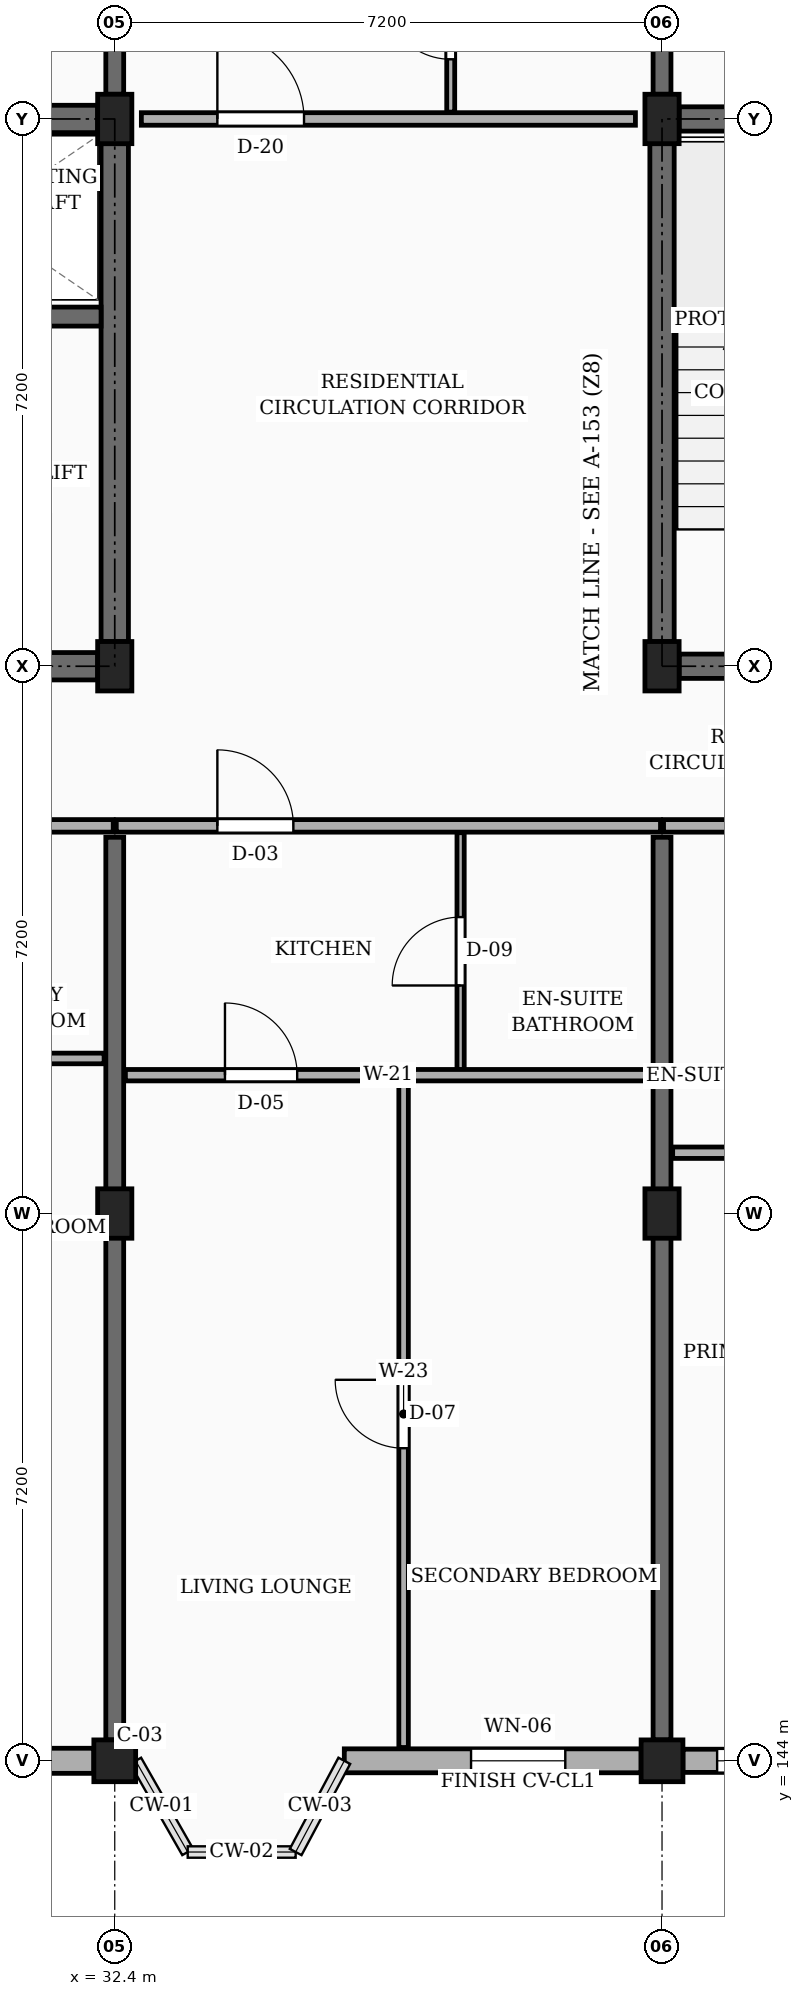
"""IFC4 building model, lengths in metres.
Left out: names, types, materials, properties, quantities, classifications, styles, units other than length and angle.
Written with IfcOpenShell. Run it as: python <this file> out.ifc"""

import sys

from ifc_helpers import new_model, si_unit, direction, frame, frame_2d, origin, origin_2d, place, context, subcontext, project, spatial, rectangle, extrude, element, fill, save


model = new_model("IFC4")
c1 = context("Model", 3, precision=1e-05, world=origin(), true_north=direction((0.0, 1.0)))
c2 = subcontext(c1, "Body", "Model", "MODEL_VIEW")
j1 = project(units=[si_unit("LENGTHUNIT", "METRE"), si_unit("PLANEANGLEUNIT", "RADIAN")], contexts=[c1])
p1 = place(None, origin())
s1 = spatial("IfcSite", under=j1, at=p1, CompositionType="ELEMENT")
p2 = place(p1, origin())
s2 = spatial("IfcBuilding", under=s1, at=p2, CompositionType="ELEMENT")
p3 = place(p2, frame((0.0, 0.0, 17.1)))
s3 = spatial("IfcBuildingStorey", under=s2, at=p3, CompositionType="ELEMENT", Elevation=17.1)
p4 = place(p3, frame((32.4, 144.0, 0.0), z_axis=(0.0, 0.0, 1.0), x_axis=(1.0, 0.0, 0.0)))
e1 = element("IfcColumn", 1, at=p4, inside=s3, PredefinedType="COLUMN", context=c2, shape_type="SweptSolid", body=[
    extrude(rectangle(XDim=0.55, YDim=0.55, at=origin_2d()), origin(), (0.0, 0.0, 1.0), 3.15),
])
for number, where, z_axis, x_axis in (
    (2, (32.4, 151.2, 0.0), (0.0, 0.0, 1.0), (1.0, 0.0, 0.0)),
    (3, (32.4, 158.4, 0.0), (0.0, 0.0, 1.0), (1.0, 0.0, 0.0)),
    (4, (32.4, 165.6, 0.0), (0.0, 0.0, 1.0), (1.0, 0.0, 0.0)),
):
    element("IfcColumn", number, at=place(p3, frame(where, z_axis=z_axis, x_axis=x_axis)), inside=s3, PredefinedType="COLUMN", context=c2, shape_type="SweptSolid", body=[
        extrude(rectangle(XDim=0.45, YDim=0.65, at=origin_2d()), origin(), (0.0, 0.0, 1.0), 3.15),
    ])
p5 = place(p3, frame((39.6, 144.0, 0.0), z_axis=(0.0, 0.0, 1.0), x_axis=(1.0, 0.0, 0.0)))
e5 = element("IfcColumn", 5, at=p5, inside=s3, PredefinedType="COLUMN", context=c2, shape_type="SweptSolid", body=[
    extrude(rectangle(XDim=0.55, YDim=0.55, at=origin_2d()), origin(), (0.0, 0.0, 1.0), 3.15),
])
for number, where, z_axis, x_axis in (
    (6, (39.6, 151.2, 0.0), (0.0, 0.0, 1.0), (1.0, 0.0, 0.0)),
    (7, (39.6, 158.4, 0.0), (0.0, 0.0, 1.0), (1.0, 0.0, 0.0)),
    (8, (39.6, 165.6, 0.0), (0.0, 0.0, 1.0), (1.0, 0.0, 0.0)),
):
    element("IfcColumn", number, at=place(p3, frame(where, z_axis=z_axis, x_axis=x_axis)), inside=s3, PredefinedType="COLUMN", context=c2, shape_type="SweptSolid", body=[
        extrude(rectangle(XDim=0.45, YDim=0.65, at=origin_2d()), origin(), (0.0, 0.0, 1.0), 3.15),
    ])
p6 = place(p3, frame((32.4, 144.275, 0.0), z_axis=(0.0, 0.0, 1.0), x_axis=(0.0, 1.0, 0.0)))
e9 = element("IfcWall", 9, at=p6, inside=s3, PredefinedType="SOLIDWALL", context=c2, shape_type="SweptSolid", body=[
    extrude(rectangle(XDim=11.875, YDim=0.235, at=frame_2d((5.938, 0.0))), origin(), (0.0, 0.0, 1.0), 2.185),
])
p7 = place(p3, frame((32.4, 165.925, 0.0), z_axis=(0.0, 0.0, 1.0), x_axis=(0.0, 1.0, 0.0)))
e10 = element("IfcWall", 10, at=p7, inside=s3, PredefinedType="SOLIDWALL", context=c2, shape_type="SweptSolid", body=[
    extrude(rectangle(XDim=6.6, YDim=0.235, at=frame_2d((3.3, 0.0))), origin(), (0.0, 0.0, 1.0), 2.185),
])
p8 = place(p3, frame((39.6, 144.275, 0.0), z_axis=(0.0, 0.0, 1.0), x_axis=(0.0, 1.0, 0.0)))
e11 = element("IfcWall", 11, at=p8, inside=s3, PredefinedType="SOLIDWALL", context=c2, shape_type="SweptSolid", body=[
    extrude(rectangle(XDim=11.875, YDim=0.235, at=frame_2d((5.938, 0.0))), origin(), (0.0, 0.0, 1.0), 2.185),
])
p9 = place(p3, frame((39.6, 165.925, 0.0), z_axis=(0.0, 0.0, 1.0), x_axis=(0.0, 1.0, 0.0)))
e12 = element("IfcWall", 12, at=p9, inside=s3, PredefinedType="SOLIDWALL", context=c2, shape_type="SweptSolid", body=[
    extrude(rectangle(XDim=6.6, YDim=0.235, at=frame_2d((3.3, 0.0))), origin(), (0.0, 0.0, 1.0), 2.185),
])
p10 = place(p9, frame((4.15, 0.0, 0.0)))
e13 = element("IfcOpeningElement", 13, at=p10, cuts=e12, PredefinedType="OPENING", context=c2, shape_type="SweptSolid", body=[
    extrude(rectangle(XDim=0.98, YDim=2.12, at=frame_2d((0.49, 1.06))), frame((0.0, 0.127, 0.0), z_axis=(0.0, -1.0, 0.0), x_axis=(1.0, 0.0, 0.0)), (0.0, 0.0, 1.0), 0.255),
])
p11 = place(p3, frame((25.475, 144.0, 0.0), z_axis=(0.0, 0.0, 1.0), x_axis=(1.0, 0.0, 0.0)))
e14 = element("IfcWall", 14, at=p11, inside=s3, PredefinedType="SOLIDWALL", context=c2, shape_type="SweptSolid", body=[
    extrude(rectangle(XDim=6.65, YDim=0.33, at=frame_2d((3.325, 0.0))), origin(), (0.0, 0.0, 1.0), 2.455),
])
p12 = place(p11, frame((0.45, 0.0, 0.78)))
e15 = element("IfcOpeningElement", 15, at=p12, cuts=e14, PredefinedType="OPENING", context=c2, shape_type="SweptSolid", body=[
    extrude(rectangle(XDim=1.08, YDim=1.15, at=frame_2d((0.54, 0.575))), frame((0.0, 0.175, 0.0), z_axis=(0.0, -1.0, 0.0), x_axis=(1.0, 0.0, 0.0)), (0.0, 0.0, 1.0), 0.35),
])
p13 = place(p11, frame((4.65, 0.0, 0.78)))
e16 = element("IfcOpeningElement", 16, at=p13, cuts=e14, PredefinedType="OPENING", context=c2, shape_type="SweptSolid", body=[
    extrude(rectangle(XDim=1.24, YDim=1.15, at=frame_2d((0.62, 0.575))), frame((0.0, 0.175, 0.0), z_axis=(0.0, -1.0, 0.0), x_axis=(1.0, 0.0, 0.0)), (0.0, 0.0, 1.0), 0.35),
])
p14 = place(p3, frame((35.42, 144.0, 0.0), z_axis=(0.0, 0.0, 1.0), x_axis=(1.0, 0.0, 0.0)))
e17 = element("IfcWall", 17, at=p14, inside=s3, PredefinedType="SOLIDWALL", context=c2, shape_type="SweptSolid", body=[
    extrude(rectangle(XDim=3.905, YDim=0.315, at=frame_2d((1.953, 0.0))), origin(), (0.0, 0.0, 1.0), 2.455),
])
p15 = place(p14, frame((1.667, 0.0, 0.78)))
e18 = element("IfcOpeningElement", 18, at=p15, cuts=e17, PredefinedType="OPENING", context=c2, shape_type="SweptSolid", body=[
    extrude(rectangle(XDim=1.24, YDim=1.15, at=frame_2d((0.62, 0.575))), frame((0.0, 0.167, 0.0), z_axis=(0.0, -1.0, 0.0), x_axis=(1.0, 0.0, 0.0)), (0.0, 0.0, 1.0), 0.335),
])
p16 = place(p3, frame((39.875, 144.0, 0.0), z_axis=(0.0, 0.0, 1.0), x_axis=(1.0, 0.0, 0.0)))
e19 = element("IfcWall", 19, at=p16, inside=s3, PredefinedType="SOLIDWALL", context=c2, shape_type="SweptSolid", body=[
    extrude(rectangle(XDim=6.65, YDim=0.305, at=frame_2d((3.325, 0.0))), origin(), (0.0, 0.0, 1.0), 2.455),
])
p17 = place(p16, frame((0.45, 0.0, 0.78)))
e20 = element("IfcOpeningElement", 20, at=p17, cuts=e19, PredefinedType="OPENING", context=c2, shape_type="SweptSolid", body=[
    extrude(rectangle(XDim=1.32, YDim=1.15, at=frame_2d((0.66, 0.575))), frame((0.0, 0.163, 0.0), z_axis=(0.0, -1.0, 0.0), x_axis=(1.0, 0.0, 0.0)), (0.0, 0.0, 1.0), 0.325),
])
p18 = place(p16, frame((4.65, 0.0, 0.78)))
e21 = element("IfcOpeningElement", 21, at=p18, cuts=e19, PredefinedType="OPENING", context=c2, shape_type="SweptSolid", body=[
    extrude(rectangle(XDim=0.88, YDim=1.26, at=frame_2d((0.44, 0.63))), frame((0.0, 0.163, 0.0), z_axis=(0.0, -1.0, 0.0), x_axis=(1.0, 0.0, 0.0)), (0.0, 0.0, 1.0), 0.325),
])
p19 = place(p3, frame((25.425, 165.6, 0.0), z_axis=(0.0, 0.0, 1.0), x_axis=(1.0, 0.0, 0.0)))
e22 = element("IfcWall", 22, at=p19, inside=s3, PredefinedType="SHEAR", context=c2, shape_type="SweptSolid", body=[
    extrude(rectangle(XDim=6.75, YDim=0.36, at=frame_2d((3.375, 0.0))), origin(), (0.0, 0.0, 1.0), 2.885),
])
p20 = place(p3, frame((32.4, 158.725, 0.0), z_axis=(0.0, 0.0, 1.0), x_axis=(0.0, 1.0, 0.0)))
e23 = element("IfcWall", 23, at=p20, inside=s3, PredefinedType="SHEAR", context=c2, shape_type="SweptSolid", body=[
    extrude(rectangle(XDim=6.55, YDim=0.36, at=frame_2d((3.275, 0.0))), origin(), (0.0, 0.0, 1.0), 2.885),
])
p21 = place(p3, frame((25.425, 158.4, 0.0), z_axis=(0.0, 0.0, 1.0), x_axis=(1.0, 0.0, 0.0)))
e24 = element("IfcWall", 24, at=p21, inside=s3, PredefinedType="SHEAR", context=c2, shape_type="SweptSolid", body=[
    extrude(rectangle(XDim=6.75, YDim=0.36, at=frame_2d((3.375, 0.0))), origin(), (0.0, 0.0, 1.0), 2.885),
])
p22 = place(p21, frame((4.525, 0.0, 0.0)))
e25 = element("IfcOpeningElement", 25, at=p22, cuts=e24, PredefinedType="OPENING", context=c2, shape_type="SweptSolid", body=[
    extrude(rectangle(XDim=1.1, YDim=2.15, at=frame_2d((0.55, 1.075))), frame((0.0, 0.19, 0.0), z_axis=(0.0, -1.0, 0.0), x_axis=(1.0, 0.0, 0.0)), (0.0, 0.0, 1.0), 0.38),
])
p23 = place(p3, frame((28.925, 163.0, 0.0), z_axis=(0.0, 0.0, 1.0), x_axis=(1.0, 0.0, 0.0)))
e26 = element("IfcWall", 26, at=p23, inside=s3, PredefinedType="SHEAR", context=c2, shape_type="SweptSolid", body=[
    extrude(rectangle(XDim=3.295, YDim=0.25, at=frame_2d((1.647, 0.0))), origin(), (0.0, 0.0, 1.0), 2.885),
])
p24 = place(p23, frame((1.1, 0.0, 0.0)))
e27 = element("IfcOpeningElement", 27, at=p24, cuts=e26, PredefinedType="OPENING", context=c2, shape_type="SweptSolid", body=[
    extrude(rectangle(XDim=1.1, YDim=2.2, at=frame_2d((0.55, 1.1))), frame((0.0, 0.135, 0.0), z_axis=(0.0, -1.0, 0.0), x_axis=(1.0, 0.0, 0.0)), (0.0, 0.0, 1.0), 0.27),
])
p25 = place(p3, frame((39.6, 158.725, 0.0), z_axis=(0.0, 0.0, 1.0), x_axis=(0.0, 1.0, 0.0)))
e28 = element("IfcWall", 28, at=p25, inside=s3, PredefinedType="SHEAR", context=c2, shape_type="SweptSolid", body=[
    extrude(rectangle(XDim=6.55, YDim=0.32, at=frame_2d((3.275, 0.0))), origin(), (0.0, 0.0, 1.0), 2.885),
])
p26 = place(p3, frame((39.825, 165.6, 0.0), z_axis=(0.0, 0.0, 1.0), x_axis=(1.0, 0.0, 0.0)))
e29 = element("IfcWall", 29, at=p26, inside=s3, PredefinedType="SHEAR", context=c2, shape_type="SweptSolid", body=[
    extrude(rectangle(XDim=6.75, YDim=0.32, at=frame_2d((3.375, 0.0))), origin(), (0.0, 0.0, 1.0), 2.885),
])
p27 = place(p3, frame((39.825, 158.4, 0.0), z_axis=(0.0, 0.0, 1.0), x_axis=(1.0, 0.0, 0.0)))
e30 = element("IfcWall", 30, at=p27, inside=s3, PredefinedType="SHEAR", context=c2, shape_type="SweptSolid", body=[
    extrude(rectangle(XDim=6.75, YDim=0.32, at=frame_2d((3.375, 0.0))), origin(), (0.0, 0.0, 1.0), 2.885),
])
p28 = place(p27, frame((4.525, 0.0, 0.0)))
e31 = element("IfcOpeningElement", 31, at=p28, cuts=e30, PredefinedType="OPENING", context=c2, shape_type="SweptSolid", body=[
    extrude(rectangle(XDim=1.1, YDim=2.15, at=frame_2d((0.55, 1.075))), frame((0.0, 0.17, 0.0), z_axis=(0.0, -1.0, 0.0), x_axis=(1.0, 0.0, 0.0)), (0.0, 0.0, 1.0), 0.34),
])
p29 = place(p3, frame((25.22, 156.3, 0.0), z_axis=(0.0, 0.0, 1.0), x_axis=(1.0, 0.0, 0.0)))
e32 = element("IfcWall", 32, at=p29, inside=s3, PredefinedType="PARTITIONING", context=c2, shape_type="SweptSolid", body=[
    extrude(rectangle(XDim=7.16, YDim=0.165, at=frame_2d((3.58, 0.0))), origin(), (0.0, 0.0, 1.0), 2.32),
])
p30 = place(p29, frame((1.33, 0.0, 0.0)))
e33 = element("IfcOpeningElement", 33, at=p30, cuts=e32, PredefinedType="OPENING", context=c2, shape_type="SweptSolid", body=[
    extrude(rectangle(XDim=1.14, YDim=2.18, at=frame_2d((0.57, 1.09))), frame((0.0, 0.093, 0.0), z_axis=(0.0, -1.0, 0.0), x_axis=(1.0, 0.0, 0.0)), (0.0, 0.0, 1.0), 0.185),
])
p31 = place(p3, frame((32.42, 156.3, 0.0), z_axis=(0.0, 0.0, 1.0), x_axis=(1.0, 0.0, 0.0)))
e34 = element("IfcWall", 34, at=p31, inside=s3, PredefinedType="PARTITIONING", context=c2, shape_type="SweptSolid", body=[
    extrude(rectangle(XDim=7.16, YDim=0.165, at=frame_2d((3.58, 0.0))), origin(), (0.0, 0.0, 1.0), 2.32),
])
p32 = place(p31, frame((1.33, 0.0, 0.0)))
e35 = element("IfcOpeningElement", 35, at=p32, cuts=e34, PredefinedType="OPENING", context=c2, shape_type="SweptSolid", body=[
    extrude(rectangle(XDim=1.0, YDim=2.15, at=frame_2d((0.5, 1.075))), frame((0.0, 0.093, 0.0), z_axis=(0.0, -1.0, 0.0), x_axis=(1.0, 0.0, 0.0)), (0.0, 0.0, 1.0), 0.185),
])
p33 = place(p3, frame((39.62, 156.3, 0.0), z_axis=(0.0, 0.0, 1.0), x_axis=(1.0, 0.0, 0.0)))
e36 = element("IfcWall", 36, at=p33, inside=s3, PredefinedType="PARTITIONING", context=c2, shape_type="SweptSolid", body=[
    extrude(rectangle(XDim=7.16, YDim=0.165, at=frame_2d((3.58, 0.0))), origin(), (0.0, 0.0, 1.0), 2.32),
])
p34 = place(p33, frame((4.78, 0.0, 0.0)))
e37 = element("IfcOpeningElement", 37, at=p34, cuts=e36, PredefinedType="OPENING", context=c2, shape_type="SweptSolid", body=[
    extrude(rectangle(XDim=0.94, YDim=2.12, at=frame_2d((0.47, 1.06))), frame((0.0, 0.093, 0.0), z_axis=(0.0, -1.0, 0.0), x_axis=(1.0, 0.0, 0.0)), (0.0, 0.0, 1.0), 0.185),
])
p35 = place(p3, frame((32.75, 165.6, 0.0), z_axis=(0.0, 0.0, 1.0), x_axis=(1.0, 0.0, 0.0)))
e38 = element("IfcWall", 38, at=p35, inside=s3, PredefinedType="PARTITIONING", context=c2, shape_type="SweptSolid", body=[
    extrude(rectangle(XDim=6.5, YDim=0.165, at=frame_2d((3.25, 0.0))), origin(), (0.0, 0.0, 1.0), 2.235),
])
p36 = place(p35, frame((1.0, 0.0, 0.0)))
e39 = element("IfcOpeningElement", 39, at=p36, cuts=e38, PredefinedType="OPENING", context=c2, shape_type="SweptSolid", body=[
    extrude(rectangle(XDim=1.14, YDim=2.18, at=frame_2d((0.57, 1.09))), frame((0.0, 0.093, 0.0), z_axis=(0.0, -1.0, 0.0), x_axis=(1.0, 0.0, 0.0)), (0.0, 0.0, 1.0), 0.185),
])
p37 = place(p3, frame((25.34, 153.24, 0.0), z_axis=(0.0, 0.0, 1.0), x_axis=(1.0, 0.0, 0.0)))
e40 = element("IfcWall", 40, at=p37, inside=s3, PredefinedType="PARTITIONING", context=c2, shape_type="SweptSolid", body=[
    extrude(rectangle(XDim=6.92, YDim=0.14, at=frame_2d((3.46, 0.0))), origin(), (0.0, 0.0, 1.0), 2.32),
])
p38 = place(p37, frame((1.31, 0.0, 0.0)))
e41 = element("IfcOpeningElement", 41, at=p38, cuts=e40, PredefinedType="OPENING", context=c2, shape_type="SweptSolid", body=[
    extrude(rectangle(XDim=0.92, YDim=2.1, at=frame_2d((0.46, 1.05))), frame((0.0, 0.08, 0.0), z_axis=(0.0, -1.0, 0.0), x_axis=(1.0, 0.0, 0.0)), (0.0, 0.0, 1.0), 0.16),
])
p39 = place(p3, frame((36.2, 144.175, 0.0), z_axis=(0.0, 0.0, 1.0), x_axis=(0.0, 1.0, 0.0)))
e42 = element("IfcWall", 42, at=p39, inside=s3, PredefinedType="PARTITIONING", context=c2, shape_type="SweptSolid", body=[
    extrude(rectangle(XDim=8.775, YDim=0.125, at=frame_2d((4.387, 0.0))), origin(), (0.0, 0.0, 1.0), 2.32),
])
p40 = place(p39, frame((3.938, 0.0, 0.0)))
e43 = element("IfcOpeningElement", 43, at=p40, cuts=e42, PredefinedType="OPENING", context=c2, shape_type="SweptSolid", body=[
    extrude(rectangle(XDim=0.9, YDim=2.1, at=frame_2d((0.45, 1.05))), frame((0.0, 0.073, 0.0), z_axis=(0.0, -1.0, 0.0), x_axis=(1.0, 0.0, 0.0)), (0.0, 0.0, 1.0), 0.145),
])
p41 = place(p3, frame((36.95, 153.09, 0.0), z_axis=(0.0, 0.0, 1.0), x_axis=(0.0, 1.0, 0.0)))
e44 = element("IfcWall", 44, at=p41, inside=s3, PredefinedType="PARTITIONING", context=c2, shape_type="SweptSolid", body=[
    extrude(rectangle(XDim=3.12, YDim=0.095, at=frame_2d((1.56, 0.0))), origin(), (0.0, 0.0, 1.0), 2.32),
])
p42 = place(p41, frame((1.11, 0.0, 0.0)))
e45 = element("IfcOpeningElement", 45, at=p42, cuts=e44, PredefinedType="OPENING", context=c2, shape_type="SweptSolid", body=[
    extrude(rectangle(XDim=0.9, YDim=2.05, at=frame_2d((0.45, 1.025))), frame((0.0, 0.058, 0.0), z_axis=(0.0, -1.0, 0.0), x_axis=(1.0, 0.0, 0.0)), (0.0, 0.0, 1.0), 0.115),
])
p43 = place(p3, frame((32.54, 153.02, 0.0), z_axis=(0.0, 0.0, 1.0), x_axis=(1.0, 0.0, 0.0)))
e46 = element("IfcWall", 46, at=p43, inside=s3, PredefinedType="PARTITIONING", context=c2, shape_type="SweptSolid", body=[
    extrude(rectangle(XDim=6.92, YDim=0.15, at=frame_2d((3.46, 0.0))), origin(), (0.0, 0.0, 1.0), 2.32),
])
p44 = place(p43, frame((1.31, 0.0, 0.0)))
e47 = element("IfcOpeningElement", 47, at=p44, cuts=e46, PredefinedType="OPENING", context=c2, shape_type="SweptSolid", body=[
    extrude(rectangle(XDim=0.95, YDim=2.1, at=frame_2d((0.475, 1.05))), frame((0.0, 0.085, 0.0), z_axis=(0.0, -1.0, 0.0), x_axis=(1.0, 0.0, 0.0)), (0.0, 0.0, 1.0), 0.17),
])
p45 = place(p3, frame((36.82, 165.69, 0.0), z_axis=(0.0, 0.0, 1.0), x_axis=(0.0, 1.0, 0.0)))
e48 = element("IfcWall", 48, at=p45, inside=s3, PredefinedType="PARTITIONING", context=c2, shape_type="SweptSolid", body=[
    extrude(rectangle(XDim=2.26, YDim=0.105, at=frame_2d((1.13, 0.0))), origin(), (0.0, 0.0, 1.0), 2.32),
])
p46 = place(p45, frame((0.695, 0.0, 0.0)))
e49 = element("IfcOpeningElement", 49, at=p46, cuts=e48, PredefinedType="OPENING", context=c2, shape_type="SweptSolid", body=[
    extrude(rectangle(XDim=0.87, YDim=2.05, at=frame_2d((0.435, 1.025))), frame((0.0, 0.062, 0.0), z_axis=(0.0, -1.0, 0.0), x_axis=(1.0, 0.0, 0.0)), (0.0, 0.0, 1.0), 0.125),
])
p47 = place(p3, frame((39.74, 152.0, 0.0), z_axis=(0.0, 0.0, 1.0), x_axis=(1.0, 0.0, 0.0)))
e50 = element("IfcWall", 50, at=p47, inside=s3, PredefinedType="PARTITIONING", context=c2, shape_type="SweptSolid", body=[
    extrude(rectangle(XDim=6.92, YDim=0.15, at=frame_2d((3.46, 0.0))), origin(), (0.0, 0.0, 1.0), 2.32),
])
p48 = place(p47, frame((4.66, 0.0, 0.0)))
e51 = element("IfcOpeningElement", 51, at=p48, cuts=e50, PredefinedType="OPENING", context=c2, shape_type="SweptSolid", body=[
    extrude(rectangle(XDim=0.95, YDim=2.1, at=frame_2d((0.475, 1.05))), frame((0.0, 0.085, 0.0), z_axis=(0.0, -1.0, 0.0), x_axis=(1.0, 0.0, 0.0)), (0.0, 0.0, 1.0), 0.17),
])
p49 = place(p15, origin())
e52 = element("IfcWindow", 52, at=p49, inside=s3, PartitioningType="SINGLE_PANEL", PredefinedType="WINDOW", context=c2, shape_type="SweptSolid", body=[
    extrude(rectangle(XDim=1.24, YDim=1.15, at=frame_2d((0.62, 0.575))), frame((0.0, 0.03, 0.0), z_axis=(0.0, -1.0, 0.0), x_axis=(1.0, 0.0, 0.0)), (0.0, 0.0, 1.0), 0.06),
])
fill(e18, e52)
p50 = place(p17, origin())
e53 = element("IfcWindow", 53, at=p50, inside=s3, PartitioningType="SINGLE_PANEL", PredefinedType="WINDOW", context=c2, shape_type="SweptSolid", body=[
    extrude(rectangle(XDim=1.32, YDim=1.15, at=frame_2d((0.66, 0.575))), frame((0.0, 0.03, 0.0), z_axis=(0.0, -1.0, 0.0), x_axis=(1.0, 0.0, 0.0)), (0.0, 0.0, 1.0), 0.06),
])
fill(e20, e53)
p51 = place(p32, origin())
e54 = element("IfcDoor", 54, at=p51, inside=s3, OperationType="SINGLE_SWING_LEFT", PredefinedType="DOOR", context=c2, shape_type="SweptSolid", body=[
    extrude(rectangle(XDim=1.0, YDim=2.15, at=frame_2d((0.5, 1.075))), frame((0.0, 0.025, 0.0), z_axis=(0.0, -1.0, 0.0), x_axis=(1.0, 0.0, 0.0)), (0.0, 0.0, 1.0), 0.05),
])
fill(e35, e54)
p52 = place(p36, origin())
e55 = element("IfcDoor", 55, at=p52, inside=s3, OperationType="SINGLE_SWING_LEFT", PredefinedType="DOOR", context=c2, shape_type="SweptSolid", body=[
    extrude(rectangle(XDim=1.14, YDim=2.18, at=frame_2d((0.57, 1.09))), frame((0.0, 0.025, 0.0), z_axis=(0.0, -1.0, 0.0), x_axis=(1.0, 0.0, 0.0)), (0.0, 0.0, 1.0), 0.05),
])
fill(e39, e55)
p53 = place(p40, origin())
e56 = element("IfcDoor", 56, at=p53, inside=s3, OperationType="SINGLE_SWING_RIGHT", PredefinedType="DOOR", context=c2, shape_type="SweptSolid", body=[
    extrude(rectangle(XDim=0.9, YDim=2.1, at=frame_2d((0.45, 1.05))), frame((0.0, 0.025, 0.0), z_axis=(0.0, -1.0, 0.0), x_axis=(1.0, 0.0, 0.0)), (0.0, 0.0, 1.0), 0.05),
])
fill(e43, e56)
p54 = place(p42, origin())
e57 = element("IfcDoor", 57, at=p54, inside=s3, OperationType="SINGLE_SWING_LEFT", PredefinedType="DOOR", context=c2, shape_type="SweptSolid", body=[
    extrude(rectangle(XDim=0.9, YDim=2.05, at=frame_2d((0.45, 1.025))), frame((0.0, 0.025, 0.0), z_axis=(0.0, -1.0, 0.0), x_axis=(1.0, 0.0, 0.0)), (0.0, 0.0, 1.0), 0.05),
])
fill(e45, e57)
p55 = place(p44, origin())
e58 = element("IfcDoor", 58, at=p55, inside=s3, OperationType="SINGLE_SWING_LEFT", PredefinedType="DOOR", context=c2, shape_type="SweptSolid", body=[
    extrude(rectangle(XDim=0.95, YDim=2.1, at=frame_2d((0.475, 1.05))), frame((0.0, 0.025, 0.0), z_axis=(0.0, -1.0, 0.0), x_axis=(1.0, 0.0, 0.0)), (0.0, 0.0, 1.0), 0.05),
])
fill(e47, e58)
p56 = place(p46, origin())
e59 = element("IfcDoor", 59, at=p56, inside=s3, OperationType="SINGLE_SWING_RIGHT", PredefinedType="DOOR", context=c2, shape_type="SweptSolid", body=[
    extrude(rectangle(XDim=0.87, YDim=2.05, at=frame_2d((0.435, 1.025))), frame((0.0, 0.025, 0.0), z_axis=(0.0, -1.0, 0.0), x_axis=(1.0, 0.0, 0.0)), (0.0, 0.0, 1.0), 0.05),
])
fill(e49, e59)
save(model, sys.argv[1])
